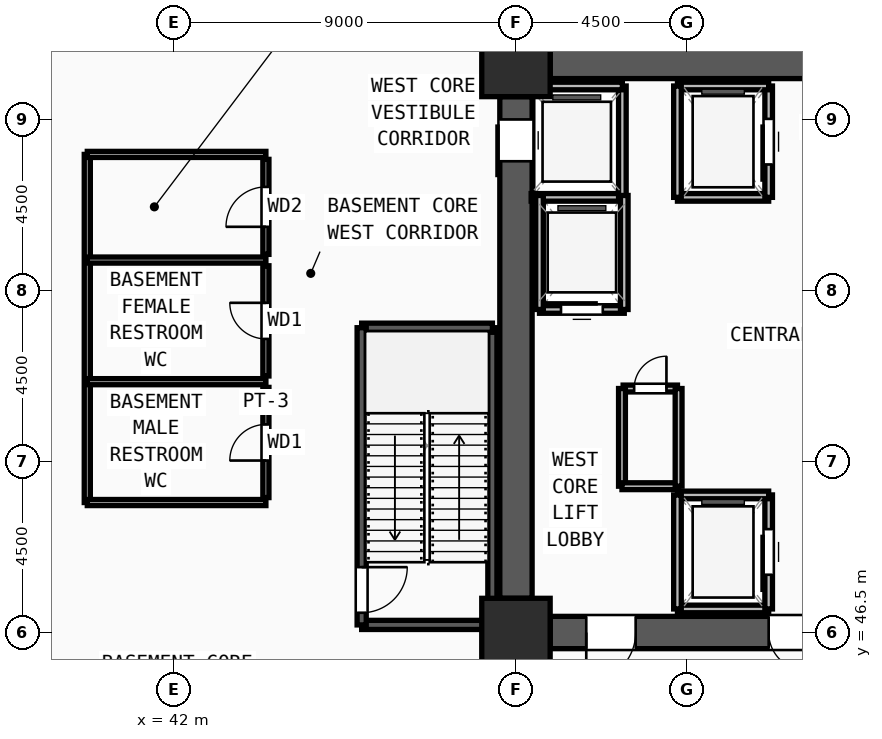
"""IFC4 building model, lengths in metres.
Left out: names, types, materials, properties, quantities, classifications, styles, units other than length and angle.
Written with IfcOpenShell. Run it as: python <this file> out.ifc"""

import sys

from ifc_helpers import new_model, si_unit, direction, frame, frame_2d, origin, origin_2d, place, context, subcontext, project, spatial, rectangle, extrude, source, transform, mapped, element, fill, save


model = new_model("IFC4")
c1 = context("Model", 3, precision=1e-05, world=origin(), true_north=direction((0.0, 1.0)))
c2 = subcontext(c1, "Body", "Model", "MODEL_VIEW")
j1 = project(units=[si_unit("LENGTHUNIT", "METRE"), si_unit("PLANEANGLEUNIT", "RADIAN")], contexts=[c1])
p1 = place(None, origin())
s1 = spatial("IfcSite", under=j1, at=p1, CompositionType="ELEMENT")
p2 = place(p1, origin())
s2 = spatial("IfcBuilding", under=s1, at=p2, CompositionType="ELEMENT")
p3 = place(p2, frame((0.0, 0.0, -4.8)))
s3 = spatial("IfcBuildingStorey", under=s2, at=p3, CompositionType="ELEMENT", Elevation=-4.8)
m1 = source(origin(), c2, "Body", "SweptSolid", [
    extrude(rectangle(XDim=1.8, YDim=1.8, at=origin_2d()), origin(), (0.0, 0.0, 1.0), 4.8),
])
for number, where, z_axis, x_axis in (
    (1, (51.0, 46.5, 0.0), (0.0, 0.0, 1.0), (1.0, 0.0, 0.0)),
    (2, (51.0, 61.5, 0.0), (0.0, 0.0, 1.0), (1.0, 0.0, 0.0)),
):
    element("IfcColumn", number, at=place(p3, frame(where, z_axis=z_axis, x_axis=x_axis)), inside=s3, PredefinedType="COLUMN", context=c2, shape_type="MappedRepresentation", body=[
        mapped(m1, transform((0.0, 0.0, 0.0), x_axis=(1.0, 0.0, 0.0), y_axis=(0.0, 1.0, 0.0), z_axis=(0.0, 0.0, 1.0), scale=1.0)),
    ])
p4 = place(p3, frame((51.9, 61.5, 0.0), z_axis=(0.0, 0.0, 1.0), x_axis=(1.0, 0.0, 0.0)))
e3 = element("IfcWall", 3, at=p4, inside=s3, PredefinedType="SHEAR", context=c2, shape_type="SweptSolid", body=[
    extrude(rectangle(XDim=7.2, YDim=0.85, at=frame_2d((3.6, 0.0))), origin(), (0.0, 0.0, 1.0), 4.55),
])
p5 = place(p3, frame((59.1, 46.5, 0.0), z_axis=(0.0, 0.0, 1.0), x_axis=(-1.0, 0.0, 0.0)))
e4 = element("IfcWall", 4, at=p5, inside=s3, PredefinedType="SHEAR", context=c2, shape_type="SweptSolid", body=[
    extrude(rectangle(XDim=7.2, YDim=0.85, at=frame_2d((3.6, 0.0))), origin(), (0.0, 0.0, 1.0), 4.55),
])
m2 = source(origin(), c2, "Body", "SweptSolid", [
    extrude(rectangle(XDim=1.3, YDim=2.2, at=frame_2d((0.65, 1.1))), frame((0.0, 0.435, 0.0), z_axis=(0.0, -1.0, 0.0), x_axis=(1.0, 0.0, 0.0)), (0.0, 0.0, 1.0), 0.87),
])
p6 = place(p5, frame((4.95, 0.0, 0.0)))
e5 = element("IfcOpeningElement", 5, at=p6, cuts=e4, PredefinedType="OPENING", context=c2, shape_type="MappedRepresentation", body=[
    mapped(m2, transform((0.0, 0.0, 0.0), x_axis=(1.0, 0.0, 0.0), y_axis=(0.0, 1.0, 0.0), z_axis=(0.0, 0.0, 1.0), scale=1.0)),
])
m3 = source(origin(), c2, "Body", "SweptSolid", [
    extrude(rectangle(XDim=1.0, YDim=2.2, at=frame_2d((0.5, 1.1))), frame((0.0, 0.435, 0.0), z_axis=(0.0, -1.0, 0.0), x_axis=(1.0, 0.0, 0.0)), (0.0, 0.0, 1.0), 0.87),
])
p7 = place(p5, frame((0.45, 0.0, 0.0)))
e6 = element("IfcOpeningElement", 6, at=p7, cuts=e4, PredefinedType="OPENING", context=c2, shape_type="MappedRepresentation", body=[
    mapped(m3, transform((0.0, 0.0, 0.0), x_axis=(1.0, 0.0, 0.0), y_axis=(0.0, 1.0, 0.0), z_axis=(0.0, 0.0, 1.0), scale=1.0)),
])
p8 = place(p3, frame((51.0, 47.4, 0.0), z_axis=(0.0, 0.0, 1.0), x_axis=(0.0, 1.0, 0.0)))
e7 = element("IfcWall", 7, at=p8, inside=s3, PredefinedType="SHEAR", context=c2, shape_type="SweptSolid", body=[
    extrude(rectangle(XDim=13.2, YDim=0.85, at=frame_2d((6.6, 0.0))), origin(), (0.0, 0.0, 1.0), 4.55),
])
m4 = source(origin(), c2, "Body", "SweptSolid", [
    extrude(rectangle(XDim=1.1, YDim=2.2, at=frame_2d((0.55, 1.1))), frame((0.0, 0.435, 0.0), z_axis=(0.0, -1.0, 0.0), x_axis=(1.0, 0.0, 0.0)), (0.0, 0.0, 1.0), 0.87),
])
p9 = place(p8, frame((11.5, 0.0, 0.0)))
e8 = element("IfcOpeningElement", 8, at=p9, cuts=e7, PredefinedType="OPENING", context=c2, shape_type="MappedRepresentation", body=[
    mapped(m4, transform((0.0, 0.0, 0.0), x_axis=(1.0, 0.0, 0.0), y_axis=(0.0, 1.0, 0.0), z_axis=(0.0, 0.0, 1.0), scale=1.0)),
])
p10 = place(p3, frame((46.94, 46.7, 0.0), z_axis=(0.0, 0.0, 1.0), x_axis=(1.0, 0.0, 0.0)))
e9 = element("IfcWall", 9, at=p10, inside=s3, PredefinedType="SOLIDWALL", context=c2, shape_type="SweptSolid", body=[
    extrude(rectangle(XDim=3.44, YDim=0.24, at=frame_2d((1.72, 0.0))), origin(), (0.0, 0.0, 1.0), 4.55),
])
p11 = place(p3, frame((50.38, 46.7, 0.0), z_axis=(0.0, 0.0, 1.0), x_axis=(0.0, 1.0, 0.0)))
e10 = element("IfcWall", 10, at=p11, inside=s3, PredefinedType="SOLIDWALL", context=c2, shape_type="SweptSolid", body=[
    extrude(rectangle(XDim=7.82, YDim=0.24, at=frame_2d((3.91, 0.0))), origin(), (0.0, 0.0, 1.0), 4.55),
])
p12 = place(p3, frame((50.38, 54.52, 0.0), z_axis=(0.0, 0.0, 1.0), x_axis=(-1.0, 0.0, 0.0)))
e11 = element("IfcWall", 11, at=p12, inside=s3, PredefinedType="SOLIDWALL", context=c2, shape_type="SweptSolid", body=[
    extrude(rectangle(XDim=3.44, YDim=0.24, at=frame_2d((1.72, 0.0))), origin(), (0.0, 0.0, 1.0), 4.55),
])
p13 = place(p3, frame((46.94, 54.52, 0.0), z_axis=(0.0, 0.0, 1.0), x_axis=(0.0, -1.0, 0.0)))
e12 = element("IfcWall", 12, at=p13, inside=s3, PredefinedType="SOLIDWALL", context=c2, shape_type="SweptSolid", body=[
    extrude(rectangle(XDim=7.82, YDim=0.24, at=frame_2d((3.91, 0.0))), origin(), (0.0, 0.0, 1.0), 4.55),
])
m5 = source(origin(), c2, "Body", "SweptSolid", [
    extrude(rectangle(XDim=1.2, YDim=2.2, at=frame_2d((0.6, 1.1))), frame((0.0, 0.13, 0.0), z_axis=(0.0, -1.0, 0.0), x_axis=(1.0, 0.0, 0.0)), (0.0, 0.0, 1.0), 0.26),
])
p14 = place(p13, frame((6.3, 0.0, 0.0)))
e13 = element("IfcOpeningElement", 13, at=p14, cuts=e12, PredefinedType="OPENING", context=c2, shape_type="MappedRepresentation", body=[
    mapped(m5, transform((0.0, 0.0, 0.0), x_axis=(1.0, 0.0, 0.0), y_axis=(0.0, 1.0, 0.0), z_axis=(0.0, 0.0, 1.0), scale=1.0)),
])
p15 = place(p3, frame((55.25, 47.12, 0.0), z_axis=(0.0, 0.0, 1.0), x_axis=(1.0, 0.0, 0.0)))
e14 = element("IfcWall", 14, at=p15, inside=s3, PredefinedType="SOLIDWALL", context=c2, shape_type="SweptSolid", body=[
    extrude(rectangle(XDim=2.4, YDim=0.2, at=frame_2d((1.2, 0.0))), origin(), (0.0, 0.0, 1.0), 4.55),
])
p16 = place(p3, frame((57.65, 47.12, 0.0), z_axis=(0.0, 0.0, 1.0), x_axis=(0.0, 1.0, 0.0)))
e15 = element("IfcWall", 15, at=p16, inside=s3, PredefinedType="SOLIDWALL", context=c2, shape_type="SweptSolid", body=[
    extrude(rectangle(XDim=3.0, YDim=0.2, at=frame_2d((1.5, 0.0))), origin(), (0.0, 0.0, 1.0), 4.55),
])
m6 = source(origin(), c2, "Body", "SweptSolid", [
    extrude(rectangle(XDim=1.2, YDim=2.3, at=frame_2d((0.6, 1.15))), frame((0.0, 0.11, 0.0), z_axis=(0.0, -1.0, 0.0), x_axis=(1.0, 0.0, 0.0)), (0.0, 0.0, 1.0), 0.22),
])
p17 = place(p16, frame((0.9, 0.0, 0.0)))
e16 = element("IfcOpeningElement", 16, at=p17, cuts=e15, PredefinedType="OPENING", context=c2, shape_type="MappedRepresentation", body=[
    mapped(m6, transform((0.0, 0.0, 0.0), x_axis=(1.0, 0.0, 0.0), y_axis=(0.0, 1.0, 0.0), z_axis=(0.0, 0.0, 1.0), scale=1.0)),
])
p18 = place(p3, frame((57.65, 50.12, 0.0), z_axis=(0.0, 0.0, 1.0), x_axis=(-1.0, 0.0, 0.0)))
e17 = element("IfcWall", 17, at=p18, inside=s3, PredefinedType="SOLIDWALL", context=c2, shape_type="SweptSolid", body=[
    extrude(rectangle(XDim=2.4, YDim=0.2, at=frame_2d((1.2, 0.0))), origin(), (0.0, 0.0, 1.0), 4.55),
])
p19 = place(p3, frame((55.25, 50.12, 0.0), z_axis=(0.0, 0.0, 1.0), x_axis=(0.0, -1.0, 0.0)))
e18 = element("IfcWall", 18, at=p19, inside=s3, PredefinedType="SOLIDWALL", context=c2, shape_type="SweptSolid", body=[
    extrude(rectangle(XDim=3.0, YDim=0.2, at=frame_2d((1.5, 0.0))), origin(), (0.0, 0.0, 1.0), 4.55),
])
p20 = place(p3, frame((55.25, 57.95, 0.0), z_axis=(0.0, 0.0, 1.0), x_axis=(1.0, 0.0, 0.0)))
e19 = element("IfcWall", 19, at=p20, inside=s3, PredefinedType="SOLIDWALL", context=c2, shape_type="SweptSolid", body=[
    extrude(rectangle(XDim=2.4, YDim=0.2, at=frame_2d((1.2, 0.0))), origin(), (0.0, 0.0, 1.0), 4.55),
])
p21 = place(p3, frame((57.65, 57.95, 0.0), z_axis=(0.0, 0.0, 1.0), x_axis=(0.0, 1.0, 0.0)))
e20 = element("IfcWall", 20, at=p21, inside=s3, PredefinedType="SOLIDWALL", context=c2, shape_type="SweptSolid", body=[
    extrude(rectangle(XDim=2.93, YDim=0.2, at=frame_2d((1.465, 0.0))), origin(), (0.0, 0.0, 1.0), 4.55),
])
p22 = place(p21, frame((0.865, 0.0, 0.0)))
e21 = element("IfcOpeningElement", 21, at=p22, cuts=e20, PredefinedType="OPENING", context=c2, shape_type="MappedRepresentation", body=[
    mapped(m6, transform((0.0, 0.0, 0.0), x_axis=(1.0, 0.0, 0.0), y_axis=(0.0, 1.0, 0.0), z_axis=(0.0, 0.0, 1.0), scale=1.0)),
])
p23 = place(p3, frame((57.65, 60.88, 0.0), z_axis=(0.0, 0.0, 1.0), x_axis=(-1.0, 0.0, 0.0)))
e22 = element("IfcWall", 22, at=p23, inside=s3, PredefinedType="SOLIDWALL", context=c2, shape_type="SweptSolid", body=[
    extrude(rectangle(XDim=2.4, YDim=0.2, at=frame_2d((1.2, 0.0))), origin(), (0.0, 0.0, 1.0), 4.55),
])
p24 = place(p3, frame((55.25, 60.88, 0.0), z_axis=(0.0, 0.0, 1.0), x_axis=(0.0, -1.0, 0.0)))
e23 = element("IfcWall", 23, at=p24, inside=s3, PredefinedType="SOLIDWALL", context=c2, shape_type="SweptSolid", body=[
    extrude(rectangle(XDim=2.93, YDim=0.2, at=frame_2d((1.465, 0.0))), origin(), (0.0, 0.0, 1.0), 4.55),
])
p25 = place(p3, frame((51.4, 57.95, 0.0), z_axis=(0.0, 0.0, 1.0), x_axis=(1.0, 0.0, 0.0)))
e24 = element("IfcWall", 24, at=p25, inside=s3, PredefinedType="SOLIDWALL", context=c2, shape_type="SweptSolid", body=[
    extrude(rectangle(XDim=2.4, YDim=0.2, at=frame_2d((1.2, 0.0))), origin(), (0.0, 0.0, 1.0), 4.55),
])
p26 = place(p3, frame((53.8, 57.95, 0.0), z_axis=(0.0, 0.0, 1.0), x_axis=(0.0, 1.0, 0.0)))
e25 = element("IfcWall", 25, at=p26, inside=s3, PredefinedType="SOLIDWALL", context=c2, shape_type="SweptSolid", body=[
    extrude(rectangle(XDim=2.93, YDim=0.2, at=frame_2d((1.465, 0.0))), origin(), (0.0, 0.0, 1.0), 4.55),
])
p27 = place(p3, frame((53.8, 60.88, 0.0), z_axis=(0.0, 0.0, 1.0), x_axis=(-1.0, 0.0, 0.0)))
e26 = element("IfcWall", 26, at=p27, inside=s3, PredefinedType="SOLIDWALL", context=c2, shape_type="SweptSolid", body=[
    extrude(rectangle(XDim=2.4, YDim=0.2, at=frame_2d((1.2, 0.0))), origin(), (0.0, 0.0, 1.0), 4.55),
])
p28 = place(p3, frame((51.62, 55.0, 0.0), z_axis=(0.0, 0.0, 1.0), x_axis=(1.0, 0.0, 0.0)))
e27 = element("IfcWall", 27, at=p28, inside=s3, PredefinedType="SOLIDWALL", context=c2, shape_type="SweptSolid", body=[
    extrude(rectangle(XDim=2.23, YDim=0.2, at=frame_2d((1.115, 0.0))), origin(), (0.0, 0.0, 1.0), 4.55),
])
m7 = source(origin(), c2, "Body", "SweptSolid", [
    extrude(rectangle(XDim=1.1, YDim=2.2, at=frame_2d((0.55, 1.1))), frame((0.0, 0.11, 0.0), z_axis=(0.0, -1.0, 0.0), x_axis=(1.0, 0.0, 0.0)), (0.0, 0.0, 1.0), 0.22),
])
p29 = place(p28, frame((0.565, 0.0, 0.0)))
e28 = element("IfcOpeningElement", 28, at=p29, cuts=e27, PredefinedType="OPENING", context=c2, shape_type="MappedRepresentation", body=[
    mapped(m7, transform((0.0, 0.0, 0.0), x_axis=(1.0, 0.0, 0.0), y_axis=(0.0, 1.0, 0.0), z_axis=(0.0, 0.0, 1.0), scale=1.0)),
])
for number, where, z_axis, x_axis in (
    (29, (53.85, 55.0, 0.0), (0.0, 0.0, 1.0), (0.0, 1.0, 0.0)),
    (30, (51.62, 58.0, 0.0), (0.0, 0.0, 1.0), (0.0, -1.0, 0.0)),
):
    element("IfcWall", number, at=place(p3, frame(where, z_axis=z_axis, x_axis=x_axis)), inside=s3, PredefinedType="SOLIDWALL", context=c2, shape_type="SweptSolid", body=[
        extrude(rectangle(XDim=3.0, YDim=0.2, at=frame_2d((1.5, 0.0))), origin(), (0.0, 0.0, 1.0), 4.55),
    ])
p30 = place(p3, frame((53.82, 52.92, 0.0), z_axis=(0.0, 0.0, 1.0), x_axis=(1.0, 0.0, 0.0)))
e31 = element("IfcWall", 31, at=p30, inside=s3, PredefinedType="PARTITIONING", context=c2, shape_type="SweptSolid", body=[
    extrude(rectangle(XDim=1.43, YDim=0.18, at=frame_2d((0.715, 0.0))), origin(), (0.0, 0.0, 1.0), 4.55),
])
m8 = source(origin(), c2, "Body", "SweptSolid", [
    extrude(rectangle(XDim=0.85, YDim=2.1, at=frame_2d((0.425, 1.05))), frame((0.0, 0.1, 0.0), z_axis=(0.0, -1.0, 0.0), x_axis=(1.0, 0.0, 0.0)), (0.0, 0.0, 1.0), 0.2),
])
p31 = place(p30, frame((0.29, 0.0, 0.0)))
e32 = element("IfcOpeningElement", 32, at=p31, cuts=e31, PredefinedType="OPENING", context=c2, shape_type="MappedRepresentation", body=[
    mapped(m8, transform((0.0, 0.0, 0.0), x_axis=(1.0, 0.0, 0.0), y_axis=(0.0, 1.0, 0.0), z_axis=(0.0, 0.0, 1.0), scale=1.0)),
])
p32 = place(p3, frame((44.42, 50.05, 0.0), z_axis=(0.0, 0.0, 1.0), x_axis=(0.0, 1.0, 0.0)))
e33 = element("IfcWall", 33, at=p32, inside=s3, PredefinedType="PARTITIONING", context=c2, shape_type="SweptSolid", body=[
    extrude(rectangle(XDim=2.9, YDim=0.16, at=frame_2d((1.45, 0.0))), origin(), (0.0, 0.0, 1.0), 4.55),
])
m9 = source(origin(), c2, "Body", "SweptSolid", [
    extrude(rectangle(XDim=0.95, YDim=2.15, at=frame_2d((0.475, 1.075))), frame((0.0, 0.09, 0.0), z_axis=(0.0, -1.0, 0.0), x_axis=(1.0, 0.0, 0.0)), (0.0, 0.0, 1.0), 0.18),
])
p33 = place(p32, frame((0.975, 0.0, 0.0)))
e34 = element("IfcOpeningElement", 34, at=p33, cuts=e33, PredefinedType="OPENING", context=c2, shape_type="MappedRepresentation", body=[
    mapped(m9, transform((0.0, 0.0, 0.0), x_axis=(1.0, 0.0, 0.0), y_axis=(0.0, 1.0, 0.0), z_axis=(0.0, 0.0, 1.0), scale=1.0)),
])
p34 = place(p3, frame((44.42, 53.25, 0.0), z_axis=(0.0, 0.0, 1.0), x_axis=(0.0, 1.0, 0.0)))
e35 = element("IfcWall", 35, at=p34, inside=s3, PredefinedType="PARTITIONING", context=c2, shape_type="SweptSolid", body=[
    extrude(rectangle(XDim=2.9, YDim=0.16, at=frame_2d((1.45, 0.0))), origin(), (0.0, 0.0, 1.0), 4.55),
])
p35 = place(p34, frame((0.975, 0.0, 0.0)))
e36 = element("IfcOpeningElement", 36, at=p35, cuts=e35, PredefinedType="OPENING", context=c2, shape_type="MappedRepresentation", body=[
    mapped(m9, transform((0.0, 0.0, 0.0), x_axis=(1.0, 0.0, 0.0), y_axis=(0.0, 1.0, 0.0), z_axis=(0.0, 0.0, 1.0), scale=1.0)),
])
p36 = place(p3, frame((44.42, 56.45, 0.0), z_axis=(0.0, 0.0, 1.0), x_axis=(0.0, 1.0, 0.0)))
e37 = element("IfcWall", 37, at=p36, inside=s3, PredefinedType="PARTITIONING", context=c2, shape_type="SweptSolid", body=[
    extrude(rectangle(XDim=2.5, YDim=0.16, at=frame_2d((1.25, 0.0))), origin(), (0.0, 0.0, 1.0), 4.55),
])
m10 = source(origin(), c2, "Body", "SweptSolid", [
    extrude(rectangle(XDim=1.05, YDim=2.15, at=frame_2d((0.525, 1.075))), frame((0.0, 0.09, 0.0), z_axis=(0.0, -1.0, 0.0), x_axis=(1.0, 0.0, 0.0)), (0.0, 0.0, 1.0), 0.18),
])
p37 = place(p36, frame((0.725, 0.0, 0.0)))
e38 = element("IfcOpeningElement", 38, at=p37, cuts=e37, PredefinedType="OPENING", context=c2, shape_type="MappedRepresentation", body=[
    mapped(m10, transform((0.0, 0.0, 0.0), x_axis=(1.0, 0.0, 0.0), y_axis=(0.0, 1.0, 0.0), z_axis=(0.0, 0.0, 1.0), scale=1.0)),
])
p38 = place(p3, frame((53.79, 50.35, 0.0), z_axis=(0.0, 0.0, 1.0), x_axis=(0.0, 1.0, 0.0)))
e39 = element("IfcWall", 39, at=p38, inside=s3, PredefinedType="PARTITIONING", context=c2, shape_type="SweptSolid", body=[
    extrude(rectangle(XDim=2.57, YDim=0.18, at=frame_2d((1.285, 0.0))), origin(), (0.0, 0.0, 1.0), 4.55),
])
p39 = place(p3, frame((53.79, 50.35, 0.0), z_axis=(0.0, 0.0, 1.0), x_axis=(1.0, 0.0, 0.0)))
e40 = element("IfcWall", 40, at=p39, inside=s3, PredefinedType="PARTITIONING", context=c2, shape_type="SweptSolid", body=[
    extrude(rectangle(XDim=1.49, YDim=0.18, at=frame_2d((0.745, 0.0))), origin(), (0.0, 0.0, 1.0), 4.55),
])
p40 = place(p3, frame((55.28, 50.35, 0.0), z_axis=(0.0, 0.0, 1.0), x_axis=(0.0, 1.0, 0.0)))
e41 = element("IfcWall", 41, at=p40, inside=s3, PredefinedType="PARTITIONING", context=c2, shape_type="SweptSolid", body=[
    extrude(rectangle(XDim=2.57, YDim=0.18, at=frame_2d((1.285, 0.0))), origin(), (0.0, 0.0, 1.0), 4.55),
])
p41 = place(p3, frame((39.72, 49.92, 0.0), z_axis=(0.0, 0.0, 1.0), x_axis=(0.0, 1.0, 0.0)))
e42 = element("IfcWall", 42, at=p41, inside=s3, PredefinedType="PARTITIONING", context=c2, shape_type="SweptSolid", body=[
    extrude(rectangle(XDim=9.16, YDim=0.16, at=frame_2d((4.58, 0.0))), origin(), (0.0, 0.0, 1.0), 4.55),
])
for number, where, z_axis, x_axis in (
    (43, (39.72, 49.92, 0.0), (0.0, 0.0, 1.0), (1.0, 0.0, 0.0)),
    (44, (39.72, 53.1, 0.0), (0.0, 0.0, 1.0), (1.0, 0.0, 0.0)),
    (45, (39.72, 56.3, 0.0), (0.0, 0.0, 1.0), (1.0, 0.0, 0.0)),
    (46, (39.72, 59.08, 0.0), (0.0, 0.0, 1.0), (1.0, 0.0, 0.0)),
):
    element("IfcWall", number, at=place(p3, frame(where, z_axis=z_axis, x_axis=x_axis)), inside=s3, PredefinedType="PARTITIONING", context=c2, shape_type="SweptSolid", body=[
        extrude(rectangle(XDim=4.7, YDim=0.16, at=frame_2d((2.35, 0.0))), origin(), (0.0, 0.0, 1.0), 4.55),
    ])
m11 = source(origin(), c2, "Body", "SweptSolid", [
    extrude(rectangle(XDim=1.3, YDim=2.2, at=frame_2d((0.65, 1.1))), frame((0.0, 0.025, 0.0), z_axis=(0.0, -1.0, 0.0), x_axis=(1.0, 0.0, 0.0)), (0.0, 0.0, 1.0), 0.05),
])
p42 = place(p6, origin())
e47 = element("IfcDoor", 47, at=p42, inside=s3, OperationType="SINGLE_SWING_RIGHT", PredefinedType="DOOR", context=c2, shape_type="MappedRepresentation", body=[
    mapped(m11, transform((0.0, 0.0, 0.0), x_axis=(1.0, 0.0, 0.0), y_axis=(0.0, 1.0, 0.0), z_axis=(0.0, 0.0, 1.0), scale=1.0)),
])
fill(e5, e47)
m12 = source(origin(), c2, "Body", "SweptSolid", [
    extrude(rectangle(XDim=1.0, YDim=2.2, at=frame_2d((0.5, 1.1))), frame((0.0, 0.025, 0.0), z_axis=(0.0, -1.0, 0.0), x_axis=(1.0, 0.0, 0.0)), (0.0, 0.0, 1.0), 0.05),
])
p43 = place(p7, origin())
e48 = element("IfcDoor", 48, at=p43, inside=s3, OperationType="SINGLE_SWING_LEFT", PredefinedType="DOOR", context=c2, shape_type="MappedRepresentation", body=[
    mapped(m12, transform((0.0, 0.0, 0.0), x_axis=(1.0, 0.0, 0.0), y_axis=(0.0, 1.0, 0.0), z_axis=(0.0, 0.0, 1.0), scale=1.0)),
])
fill(e6, e48)
m13 = source(origin(), c2, "Body", "SweptSolid", [
    extrude(rectangle(XDim=1.2, YDim=2.2, at=frame_2d((0.6, 1.1))), frame((0.0, 0.025, 0.0), z_axis=(0.0, -1.0, 0.0), x_axis=(1.0, 0.0, 0.0)), (0.0, 0.0, 1.0), 0.05),
])
p44 = place(p14, origin())
e49 = element("IfcDoor", 49, at=p44, inside=s3, OperationType="SINGLE_SWING_LEFT", PredefinedType="DOOR", context=c2, shape_type="MappedRepresentation", body=[
    mapped(m13, transform((0.0, 0.0, 0.0), x_axis=(1.0, 0.0, 0.0), y_axis=(0.0, 1.0, 0.0), z_axis=(0.0, 0.0, 1.0), scale=1.0)),
])
fill(e13, e49)
m14 = source(origin(), c2, "Body", "SweptSolid", [
    extrude(rectangle(XDim=1.2, YDim=2.3, at=frame_2d((0.6, 1.15))), frame((0.0, 0.025, 0.0), z_axis=(0.0, -1.0, 0.0), x_axis=(1.0, 0.0, 0.0)), (0.0, 0.0, 1.0), 0.05),
])
p45 = place(p17, origin())
e50 = element("IfcDoor", 50, at=p45, inside=s3, OperationType="SLIDING_TO_LEFT", PredefinedType="DOOR", context=c2, shape_type="MappedRepresentation", body=[
    mapped(m14, transform((0.0, 0.0, 0.0), x_axis=(1.0, 0.0, 0.0), y_axis=(0.0, 1.0, 0.0), z_axis=(0.0, 0.0, 1.0), scale=1.0)),
])
fill(e16, e50)
p46 = place(p22, origin())
e51 = element("IfcDoor", 51, at=p46, inside=s3, OperationType="SLIDING_TO_LEFT", PredefinedType="DOOR", context=c2, shape_type="MappedRepresentation", body=[
    mapped(m14, transform((0.0, 0.0, 0.0), x_axis=(1.0, 0.0, 0.0), y_axis=(0.0, 1.0, 0.0), z_axis=(0.0, 0.0, 1.0), scale=1.0)),
])
fill(e21, e51)
m15 = source(origin(), c2, "Body", "SweptSolid", [
    extrude(rectangle(XDim=1.1, YDim=2.2, at=frame_2d((0.55, 1.1))), frame((0.0, 0.025, 0.0), z_axis=(0.0, -1.0, 0.0), x_axis=(1.0, 0.0, 0.0)), (0.0, 0.0, 1.0), 0.05),
])
p47 = place(p9, origin())
e52 = element("IfcDoor", 52, at=p47, inside=s3, OperationType="SLIDING_TO_LEFT", PredefinedType="DOOR", context=c2, shape_type="MappedRepresentation", body=[
    mapped(m15, transform((0.0, 0.0, 0.0), x_axis=(1.0, 0.0, 0.0), y_axis=(0.0, 1.0, 0.0), z_axis=(0.0, 0.0, 1.0), scale=1.0)),
])
fill(e8, e52)
p48 = place(p29, origin())
e53 = element("IfcDoor", 53, at=p48, inside=s3, OperationType="SLIDING_TO_LEFT", PredefinedType="DOOR", context=c2, shape_type="MappedRepresentation", body=[
    mapped(m15, transform((0.0, 0.0, 0.0), x_axis=(1.0, 0.0, 0.0), y_axis=(0.0, 1.0, 0.0), z_axis=(0.0, 0.0, 1.0), scale=1.0)),
])
fill(e28, e53)
m16 = source(origin(), c2, "Body", "SweptSolid", [
    extrude(rectangle(XDim=0.85, YDim=2.1, at=frame_2d((0.425, 1.05))), frame((0.0, 0.025, 0.0), z_axis=(0.0, -1.0, 0.0), x_axis=(1.0, 0.0, 0.0)), (0.0, 0.0, 1.0), 0.05),
])
p49 = place(p31, origin())
e54 = element("IfcDoor", 54, at=p49, inside=s3, OperationType="SINGLE_SWING_RIGHT", PredefinedType="DOOR", context=c2, shape_type="MappedRepresentation", body=[
    mapped(m16, transform((0.0, 0.0, 0.0), x_axis=(1.0, 0.0, 0.0), y_axis=(0.0, 1.0, 0.0), z_axis=(0.0, 0.0, 1.0), scale=1.0)),
])
fill(e32, e54)
m17 = source(origin(), c2, "Body", "SweptSolid", [
    extrude(rectangle(XDim=0.95, YDim=2.15, at=frame_2d((0.475, 1.075))), frame((0.0, 0.025, 0.0), z_axis=(0.0, -1.0, 0.0), x_axis=(1.0, 0.0, 0.0)), (0.0, 0.0, 1.0), 0.05),
])
p50 = place(p33, origin())
e55 = element("IfcDoor", 55, at=p50, inside=s3, OperationType="SINGLE_SWING_LEFT", PredefinedType="DOOR", context=c2, shape_type="MappedRepresentation", body=[
    mapped(m17, transform((0.0, 0.0, 0.0), x_axis=(1.0, 0.0, 0.0), y_axis=(0.0, 1.0, 0.0), z_axis=(0.0, 0.0, 1.0), scale=1.0)),
])
fill(e34, e55)
p51 = place(p35, origin())
e56 = element("IfcDoor", 56, at=p51, inside=s3, OperationType="SINGLE_SWING_RIGHT", PredefinedType="DOOR", context=c2, shape_type="MappedRepresentation", body=[
    mapped(m17, transform((0.0, 0.0, 0.0), x_axis=(1.0, 0.0, 0.0), y_axis=(0.0, 1.0, 0.0), z_axis=(0.0, 0.0, 1.0), scale=1.0)),
])
fill(e36, e56)
m18 = source(origin(), c2, "Body", "SweptSolid", [
    extrude(rectangle(XDim=1.05, YDim=2.15, at=frame_2d((0.525, 1.075))), frame((0.0, 0.025, 0.0), z_axis=(0.0, -1.0, 0.0), x_axis=(1.0, 0.0, 0.0)), (0.0, 0.0, 1.0), 0.05),
])
p52 = place(p37, origin())
e57 = element("IfcDoor", 57, at=p52, inside=s3, OperationType="SINGLE_SWING_LEFT", PredefinedType="DOOR", context=c2, shape_type="MappedRepresentation", body=[
    mapped(m18, transform((0.0, 0.0, 0.0), x_axis=(1.0, 0.0, 0.0), y_axis=(0.0, 1.0, 0.0), z_axis=(0.0, 0.0, 1.0), scale=1.0)),
])
fill(e38, e57)
save(model, sys.argv[1])
